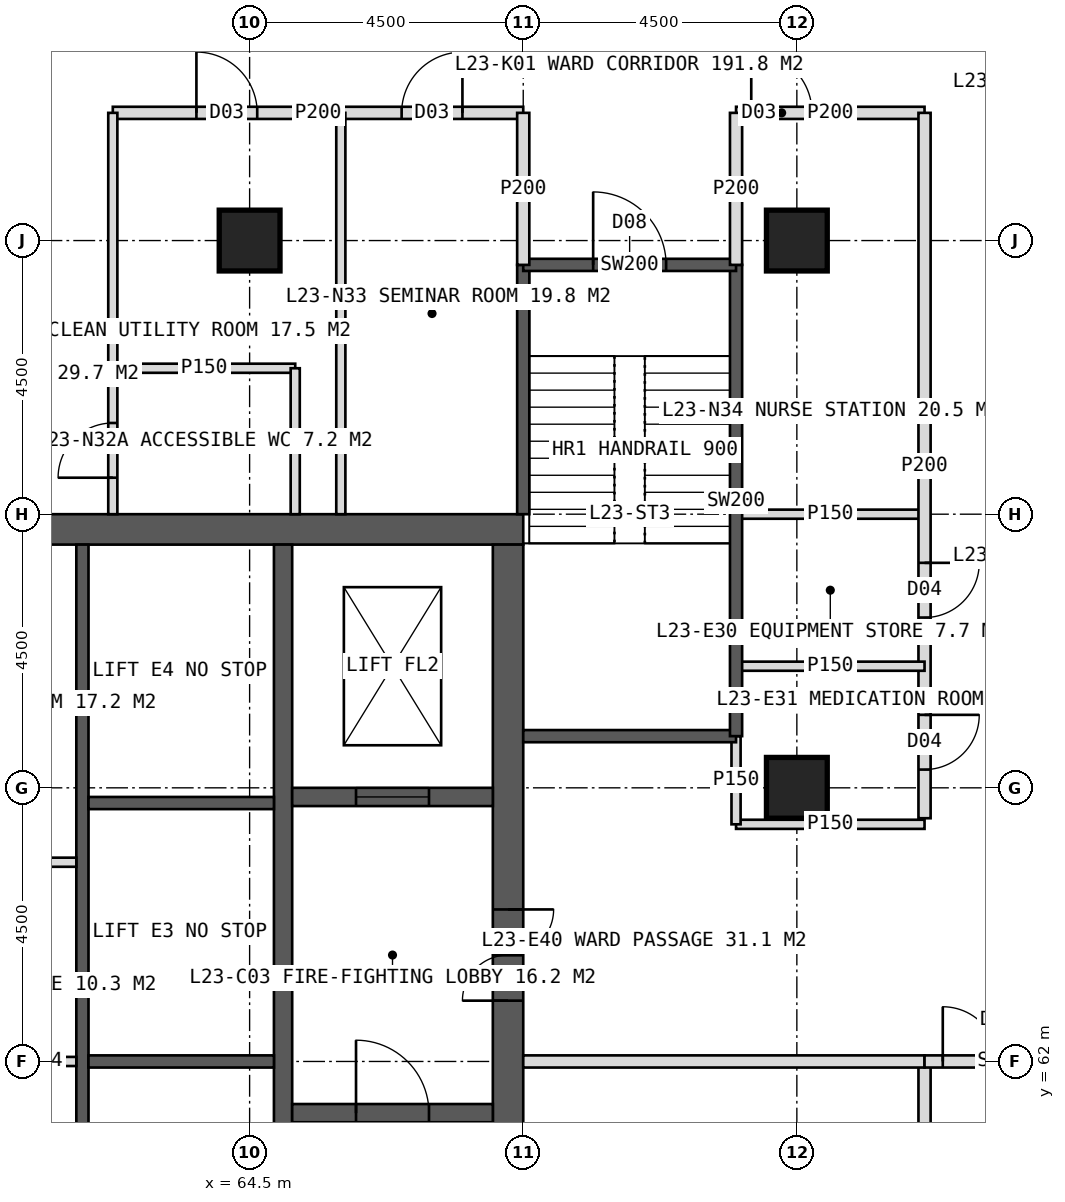
"""IFC4 building model, lengths in metres.
Left out: names, types, materials, properties, quantities, classifications, styles, units other than length and angle.
Written with IfcOpenShell. Run it as: python <this file> out.ifc"""

import sys

from ifc_helpers import new_model, si_unit, direction, frame, frame_2d, origin, origin_2d, place, context, subcontext, project, spatial, rectangle, hollow_rectangle, extrude, element, fill, save


model = new_model("IFC4")
c1 = context("Model", 3, precision=1e-05, world=origin(), true_north=direction((0.0, 1.0)))
c2 = subcontext(c1, "Body", "Model", "MODEL_VIEW")
j1 = project(units=[si_unit("LENGTHUNIT", "METRE"), si_unit("PLANEANGLEUNIT", "RADIAN")], contexts=[c1])
p1 = place(None, origin())
s1 = spatial("IfcSite", under=j1, at=p1, CompositionType="ELEMENT")
p2 = place(p1, origin())
s2 = spatial("IfcBuilding", under=s1, at=p2, CompositionType="ELEMENT")
p3 = place(p2, frame((0.0, 0.0, 100.0)))
s3 = spatial("IfcBuildingStorey", under=s2, at=p3, CompositionType="ELEMENT", Elevation=100.0)
p4 = place(p3, frame((51.0, 70.75, 0.0), z_axis=(0.0, 0.0, 1.0), x_axis=(1.0, 0.0, 0.0)))
e1 = element("IfcWall", 1, at=p4, inside=s3, PredefinedType="SHEAR", context=c2, shape_type="SweptSolid", body=[
    extrude(rectangle(XDim=18.0, YDim=0.5, at=frame_2d((9.0, 0.0))), origin(), (0.0, 0.0, 1.0), 4.0),
])
p5 = place(p4, frame((8.1, 0.0, 0.0)))
e2 = element("IfcOpeningElement", 2, at=p5, cuts=e1, PredefinedType="OPENING", context=c2, shape_type="SweptSolid", body=[
    extrude(rectangle(XDim=1.8, YDim=2.2, at=frame_2d((0.9, 1.1))), frame((0.0, 0.26, 0.0), z_axis=(0.0, -1.0, 0.0), x_axis=(1.0, 0.0, 0.0)), (0.0, 0.0, 1.0), 0.52),
])
p6 = place(p3, frame((68.75, 53.5, 0.0), z_axis=(0.0, 0.0, 1.0), x_axis=(0.0, 1.0, 0.0)))
e3 = element("IfcWall", 3, at=p6, inside=s3, PredefinedType="SHEAR", context=c2, shape_type="SweptSolid", body=[
    extrude(rectangle(XDim=17.0, YDim=0.5, at=frame_2d((8.5, 0.0))), origin(), (0.0, 0.0, 1.0), 4.0),
])
p7 = place(p6, frame((9.5, 0.0, 0.0)))
e4 = element("IfcOpeningElement", 4, at=p7, cuts=e3, PredefinedType="OPENING", context=c2, shape_type="SweptSolid", body=[
    extrude(rectangle(XDim=1.5, YDim=2.2, at=frame_2d((0.75, 1.1))), frame((0.0, 0.26, 0.0), z_axis=(0.0, -1.0, 0.0), x_axis=(1.0, 0.0, 0.0)), (0.0, 0.0, 1.0), 0.52),
])
p8 = place(p3, frame((65.05, 53.5, 0.0), z_axis=(0.0, 0.0, 1.0), x_axis=(0.0, 1.0, 0.0)))
e5 = element("IfcWall", 5, at=p8, inside=s3, PredefinedType="SHEAR", context=c2, shape_type="SweptSolid", body=[
    extrude(rectangle(XDim=17.0, YDim=0.3, at=frame_2d((8.5, 0.0))), origin(), (0.0, 0.0, 1.0), 4.0),
])
p9 = place(p3, frame((61.75, 53.5, 0.0), z_axis=(0.0, 0.0, 1.0), x_axis=(0.0, 1.0, 0.0)))
e6 = element("IfcWall", 6, at=p9, inside=s3, PredefinedType="SHEAR", context=c2, shape_type="SweptSolid", body=[
    extrude(rectangle(XDim=17.0, YDim=0.2, at=frame_2d((8.5, 0.0))), origin(), (0.0, 0.0, 1.0), 4.0),
])
p10 = place(p9, frame((1.375, 0.0, 0.0)))
e7 = element("IfcOpeningElement", 7, at=p10, cuts=e6, PredefinedType="OPENING", context=c2, shape_type="SweptSolid", body=[
    extrude(rectangle(XDim=1.4, YDim=2.2, at=frame_2d((0.7, 1.1))), frame((0.0, 0.11, 0.0), z_axis=(0.0, -1.0, 0.0), x_axis=(1.0, 0.0, 0.0)), (0.0, 0.0, 1.0), 0.22),
])
p11 = place(p9, frame((5.675, 0.0, 0.0)))
e8 = element("IfcOpeningElement", 8, at=p11, cuts=e6, PredefinedType="OPENING", context=c2, shape_type="SweptSolid", body=[
    extrude(rectangle(XDim=1.4, YDim=2.2, at=frame_2d((0.7, 1.1))), frame((0.0, 0.11, 0.0), z_axis=(0.0, -1.0, 0.0), x_axis=(1.0, 0.0, 0.0)), (0.0, 0.0, 1.0), 0.22),
])
for number, where, z_axis, x_axis in (
    (9, (61.85, 62.0, 0.0), (0.0, 0.0, 1.0), (1.0, 0.0, 0.0)),
    (10, (61.85, 66.25, 0.0), (0.0, 0.0, 1.0), (1.0, 0.0, 0.0)),
):
    element("IfcWall", number, at=place(p3, frame(where, z_axis=z_axis, x_axis=x_axis)), inside=s3, PredefinedType="SHEAR", context=c2, shape_type="SweptSolid", body=[
        extrude(rectangle(XDim=3.05, YDim=0.2, at=frame_2d((1.525, 0.0))), origin(), (0.0, 0.0, 1.0), 4.0),
    ])
p12 = place(p3, frame((65.2, 61.15, 0.0), z_axis=(0.0, 0.0, 1.0), x_axis=(1.0, 0.0, 0.0)))
e11 = element("IfcWall", 11, at=p12, inside=s3, PredefinedType="SHEAR", context=c2, shape_type="SweptSolid", body=[
    extrude(rectangle(XDim=3.3, YDim=0.3, at=frame_2d((1.65, 0.0))), origin(), (0.0, 0.0, 1.0), 4.0),
])
p13 = place(p12, frame((1.05, 0.0, 0.0)))
e12 = element("IfcOpeningElement", 12, at=p13, cuts=e11, PredefinedType="OPENING", context=c2, shape_type="SweptSolid", body=[
    extrude(rectangle(XDim=1.2, YDim=2.1, at=frame_2d((0.6, 1.05))), frame((0.0, 0.16, 0.0), z_axis=(0.0, -1.0, 0.0), x_axis=(1.0, 0.0, 0.0)), (0.0, 0.0, 1.0), 0.32),
])
p14 = place(p3, frame((65.2, 66.35, 0.0), z_axis=(0.0, 0.0, 1.0), x_axis=(1.0, 0.0, 0.0)))
e13 = element("IfcWall", 13, at=p14, inside=s3, PredefinedType="SHEAR", context=c2, shape_type="SweptSolid", body=[
    extrude(rectangle(XDim=3.3, YDim=0.3, at=frame_2d((1.65, 0.0))), origin(), (0.0, 0.0, 1.0), 4.0),
])
p15 = place(p14, frame((1.05, 0.0, 0.0)))
e14 = element("IfcOpeningElement", 14, at=p15, cuts=e13, PredefinedType="OPENING", context=c2, shape_type="SweptSolid", body=[
    extrude(rectangle(XDim=1.2, YDim=2.2, at=frame_2d((0.6, 1.1))), frame((0.0, 0.16, 0.0), z_axis=(0.0, -1.0, 0.0), x_axis=(1.0, 0.0, 0.0)), (0.0, 0.0, 1.0), 0.32),
])
for number, where, z_axis, x_axis in (
    (15, (73.5, 75.5, 0.0), (0.0, 0.0, 1.0), (1.0, 0.0, 0.0)),
    (16, (64.5, 75.5, 0.0), (0.0, 0.0, 1.0), (1.0, 0.0, 0.0)),
    (17, (73.5, 66.5, 0.0), (0.0, 0.0, 1.0), (1.0, 0.0, 0.0)),
):
    element("IfcColumn", number, at=place(p3, frame(where, z_axis=z_axis, x_axis=x_axis)), inside=s3, PredefinedType="COLUMN", context=c2, shape_type="SweptSolid", body=[
        extrude(hollow_rectangle(XDim=1.0, YDim=1.0, WallThickness=0.1, at=origin_2d()), origin(), (0.0, 0.0, 1.0), 4.0),
    ])
p16 = place(p3, frame((62.25, 77.6, 0.0), z_axis=(0.0, 0.0, 1.0), x_axis=(1.0, 0.0, 0.0)))
e18 = element("IfcWall", 18, at=p16, inside=s3, PredefinedType="PARTITIONING", context=c2, shape_type="SweptSolid", body=[
    extrude(rectangle(XDim=6.75, YDim=0.2, at=frame_2d((3.375, 0.0))), origin(), (0.0, 0.0, 1.0), 3.75),
])
p17 = place(p16, frame((1.375, 0.0, 0.0)))
e19 = element("IfcOpeningElement", 19, at=p17, cuts=e18, PredefinedType="OPENING", context=c2, shape_type="SweptSolid", body=[
    extrude(rectangle(XDim=1.0, YDim=2.1, at=frame_2d((0.5, 1.05))), frame((0.0, 0.11, 0.0), z_axis=(0.0, -1.0, 0.0), x_axis=(1.0, 0.0, 0.0)), (0.0, 0.0, 1.0), 0.22),
])
p18 = place(p16, frame((4.75, 0.0, 0.0)))
e20 = element("IfcOpeningElement", 20, at=p18, cuts=e18, PredefinedType="OPENING", context=c2, shape_type="SweptSolid", body=[
    extrude(rectangle(XDim=1.0, YDim=2.1, at=frame_2d((0.5, 1.05))), frame((0.0, 0.11, 0.0), z_axis=(0.0, -1.0, 0.0), x_axis=(1.0, 0.0, 0.0)), (0.0, 0.0, 1.0), 0.22),
])
p19 = place(p3, frame((72.5, 77.6, 0.0), z_axis=(0.0, 0.0, 1.0), x_axis=(1.0, 0.0, 0.0)))
e21 = element("IfcWall", 21, at=p19, inside=s3, PredefinedType="PARTITIONING", context=c2, shape_type="SweptSolid", body=[
    extrude(rectangle(XDim=3.1, YDim=0.2, at=frame_2d((1.55, 0.0))), origin(), (0.0, 0.0, 1.0), 3.75),
])
p20 = place(p19, frame((0.25, 0.0, 0.0)))
e22 = element("IfcOpeningElement", 22, at=p20, cuts=e21, PredefinedType="OPENING", context=c2, shape_type="SweptSolid", body=[
    extrude(rectangle(XDim=1.0, YDim=2.1, at=frame_2d((0.5, 1.05))), frame((0.0, 0.11, 0.0), z_axis=(0.0, -1.0, 0.0), x_axis=(1.0, 0.0, 0.0)), (0.0, 0.0, 1.0), 0.22),
])
p21 = place(p3, frame((62.25, 71.0, 0.0), z_axis=(0.0, 0.0, 1.0), x_axis=(0.0, 1.0, 0.0)))
e23 = element("IfcWall", 23, at=p21, inside=s3, PredefinedType="PARTITIONING", context=c2, shape_type="SweptSolid", body=[
    extrude(rectangle(XDim=6.6, YDim=0.15, at=frame_2d((3.3, 0.0))), origin(), (0.0, 0.0, 1.0), 3.75),
])
p22 = place(p21, frame((0.6, 0.0, 0.0)))
e24 = element("IfcOpeningElement", 24, at=p22, cuts=e23, PredefinedType="OPENING", context=c2, shape_type="SweptSolid", body=[
    extrude(rectangle(XDim=0.9, YDim=2.1, at=frame_2d((0.45, 1.05))), frame((0.0, 0.085, 0.0), z_axis=(0.0, -1.0, 0.0), x_axis=(1.0, 0.0, 0.0)), (0.0, 0.0, 1.0), 0.17),
])
p23 = place(p3, frame((66.0, 71.0, 0.0), z_axis=(0.0, 0.0, 1.0), x_axis=(0.0, 1.0, 0.0)))
e25 = element("IfcWall", 25, at=p23, inside=s3, PredefinedType="PARTITIONING", context=c2, shape_type="SweptSolid", body=[
    extrude(rectangle(XDim=6.6, YDim=0.15, at=frame_2d((3.3, 0.0))), origin(), (0.0, 0.0, 1.0), 3.75),
])
p24 = place(p3, frame((62.25, 73.4, 0.0), z_axis=(0.0, 0.0, 1.0), x_axis=(1.0, 0.0, 0.0)))
e26 = element("IfcWall", 26, at=p24, inside=s3, PredefinedType="PARTITIONING", context=c2, shape_type="SweptSolid", body=[
    extrude(rectangle(XDim=3.0, YDim=0.15, at=frame_2d((1.5, 0.0))), origin(), (0.0, 0.0, 1.0), 3.75),
])
p25 = place(p3, frame((65.25, 71.0, 0.0), z_axis=(0.0, 0.0, 1.0), x_axis=(0.0, 1.0, 0.0)))
e27 = element("IfcWall", 27, at=p25, inside=s3, PredefinedType="PARTITIONING", context=c2, shape_type="SweptSolid", body=[
    extrude(rectangle(XDim=2.4, YDim=0.15, at=frame_2d((1.2, 0.0))), origin(), (0.0, 0.0, 1.0), 3.75),
])
p26 = place(p3, frame((72.5, 71.0, 0.0), z_axis=(0.0, 0.0, 1.0), x_axis=(1.0, 0.0, 0.0)))
e28 = element("IfcWall", 28, at=p26, inside=s3, PredefinedType="PARTITIONING", context=c2, shape_type="SweptSolid", body=[
    extrude(rectangle(XDim=3.1, YDim=0.15, at=frame_2d((1.55, 0.0))), origin(), (0.0, 0.0, 1.0), 3.75),
])
p27 = place(p3, frame((75.6, 77.6, 0.0), z_axis=(0.0, 0.0, 1.0), x_axis=(0.0, -1.0, 0.0)))
e29 = element("IfcWall", 29, at=p27, inside=s3, PredefinedType="PARTITIONING", context=c2, shape_type="SweptSolid", body=[
    extrude(rectangle(XDim=11.6, YDim=0.2, at=frame_2d((5.8, 0.0))), origin(), (0.0, 0.0, 1.0), 3.75),
])
p28 = place(p27, frame((7.4, 0.0, 0.0)))
e30 = element("IfcOpeningElement", 30, at=p28, cuts=e29, PredefinedType="OPENING", context=c2, shape_type="SweptSolid", body=[
    extrude(rectangle(XDim=0.9, YDim=2.1, at=frame_2d((0.45, 1.05))), frame((0.0, 0.11, 0.0), z_axis=(0.0, -1.0, 0.0), x_axis=(1.0, 0.0, 0.0)), (0.0, 0.0, 1.0), 0.22),
])
p29 = place(p27, frame((9.9, 0.0, 0.0)))
e31 = element("IfcOpeningElement", 31, at=p29, cuts=e29, PredefinedType="OPENING", context=c2, shape_type="SweptSolid", body=[
    extrude(rectangle(XDim=0.9, YDim=2.1, at=frame_2d((0.45, 1.05))), frame((0.0, 0.11, 0.0), z_axis=(0.0, -1.0, 0.0), x_axis=(1.0, 0.0, 0.0)), (0.0, 0.0, 1.0), 0.22),
])
p30 = place(p3, frame((75.6, 62.0, 0.0), z_axis=(0.0, 0.0, 1.0), x_axis=(0.0, -1.0, 0.0)))
e32 = element("IfcWall", 32, at=p30, inside=s3, PredefinedType="PARTITIONING", context=c2, shape_type="SweptSolid", body=[
    extrude(rectangle(XDim=15.6, YDim=0.2, at=frame_2d((7.8, 0.0))), origin(), (0.0, 0.0, 1.0), 3.75),
])
p31 = place(p30, frame((2.5, 0.0, 0.0)))
e33 = element("IfcOpeningElement", 33, at=p31, cuts=e32, PredefinedType="OPENING", context=c2, shape_type="SweptSolid", body=[
    extrude(rectangle(XDim=1.0, YDim=2.1, at=frame_2d((0.5, 1.05))), frame((0.0, 0.11, 0.0), z_axis=(0.0, -1.0, 0.0), x_axis=(1.0, 0.0, 0.0)), (0.0, 0.0, 1.0), 0.22),
])
p32 = place(p30, frame((7.75, 0.0, 0.0)))
e34 = element("IfcOpeningElement", 34, at=p32, cuts=e32, PredefinedType="OPENING", context=c2, shape_type="SweptSolid", body=[
    extrude(rectangle(XDim=1.0, YDim=2.1, at=frame_2d((0.5, 1.05))), frame((0.0, 0.11, 0.0), z_axis=(0.0, -1.0, 0.0), x_axis=(1.0, 0.0, 0.0)), (0.0, 0.0, 1.0), 0.22),
])
p33 = place(p30, frame((12.55, 0.0, 0.0)))
e35 = element("IfcOpeningElement", 35, at=p33, cuts=e32, PredefinedType="OPENING", context=c2, shape_type="SweptSolid", body=[
    extrude(rectangle(XDim=1.0, YDim=2.1, at=frame_2d((0.5, 1.05))), frame((0.0, 0.11, 0.0), z_axis=(0.0, -1.0, 0.0), x_axis=(1.0, 0.0, 0.0)), (0.0, 0.0, 1.0), 0.22),
])
p34 = place(p3, frame((72.5, 65.9, 0.0), z_axis=(0.0, 0.0, 1.0), x_axis=(1.0, 0.0, 0.0)))
e36 = element("IfcWall", 36, at=p34, inside=s3, PredefinedType="PARTITIONING", context=c2, shape_type="SweptSolid", body=[
    extrude(rectangle(XDim=3.1, YDim=0.15, at=frame_2d((1.55, 0.0))), origin(), (0.0, 0.0, 1.0), 3.75),
])
p35 = place(p3, frame((69.0, 62.0, 0.0), z_axis=(0.0, 0.0, 1.0), x_axis=(1.0, 0.0, 0.0)))
e37 = element("IfcWall", 37, at=p35, inside=s3, PredefinedType="SOLIDWALL", context=c2, shape_type="SweptSolid", body=[
    extrude(rectangle(XDim=6.6, YDim=0.2, at=frame_2d((3.3, 0.0))), origin(), (0.0, 0.0, 1.0), 2.95),
])
p36 = place(p3, frame((72.5, 68.5, 0.0), z_axis=(0.0, 0.0, 1.0), x_axis=(1.0, 0.0, 0.0)))
e38 = element("IfcWall", 38, at=p36, inside=s3, PredefinedType="PARTITIONING", context=c2, shape_type="SweptSolid", body=[
    extrude(rectangle(XDim=3.1, YDim=0.15, at=frame_2d((1.55, 0.0))), origin(), (0.0, 0.0, 1.0), 3.75),
])
p37 = place(p3, frame((75.6, 62.0, 0.0), z_axis=(0.0, 0.0, 1.0), x_axis=(1.0, 0.0, 0.0)))
e39 = element("IfcWall", 39, at=p37, inside=s3, PredefinedType="SOLIDWALL", context=c2, shape_type="SweptSolid", body=[
    extrude(rectangle(XDim=2.7, YDim=0.2, at=frame_2d((1.35, 0.0))), origin(), (0.0, 0.0, 1.0), 2.95),
])
p38 = place(p37, frame((0.3, 0.0, 0.0)))
e40 = element("IfcOpeningElement", 40, at=p38, cuts=e39, PredefinedType="OPENING", context=c2, shape_type="SweptSolid", body=[
    extrude(rectangle(XDim=1.8, YDim=2.2, at=frame_2d((0.9, 1.1))), frame((0.0, 0.11, 0.0), z_axis=(0.0, -1.0, 0.0), x_axis=(1.0, 0.0, 0.0)), (0.0, 0.0, 1.0), 0.22),
])
p39 = place(p3, frame((58.35, 62.0, 0.0), z_axis=(0.0, 0.0, 1.0), x_axis=(1.0, 0.0, 0.0)))
e41 = element("IfcWall", 41, at=p39, inside=s3, PredefinedType="PARTITIONING", context=c2, shape_type="SweptSolid", body=[
    extrude(rectangle(XDim=3.3, YDim=0.15, at=frame_2d((1.65, 0.0))), origin(), (0.0, 0.0, 1.0), 3.75),
])
p40 = place(p39, frame((1.15, 0.0, 0.0)))
e42 = element("IfcOpeningElement", 42, at=p40, cuts=e41, PredefinedType="OPENING", context=c2, shape_type="SweptSolid", body=[
    extrude(rectangle(XDim=1.0, YDim=2.1, at=frame_2d((0.5, 1.05))), frame((0.0, 0.085, 0.0), z_axis=(0.0, -1.0, 0.0), x_axis=(1.0, 0.0, 0.0)), (0.0, 0.0, 1.0), 0.17),
])
p41 = place(p3, frame((58.35, 65.277, 0.0), z_axis=(0.0, 0.0, 1.0), x_axis=(1.0, 0.0, 0.0)))
e43 = element("IfcWall", 43, at=p41, inside=s3, PredefinedType="PARTITIONING", context=c2, shape_type="SweptSolid", body=[
    extrude(rectangle(XDim=3.3, YDim=0.15, at=frame_2d((1.65, 0.0))), origin(), (0.0, 0.0, 1.0), 3.75),
])
p42 = place(p3, frame((72.5, 65.9, 0.0), z_axis=(0.0, 0.0, 1.0), x_axis=(0.0, 1.0, 0.0)))
e44 = element("IfcWall", 44, at=p42, inside=s3, PredefinedType="PARTITIONING", context=c2, shape_type="SweptSolid", body=[
    extrude(rectangle(XDim=1.45, YDim=0.15, at=frame_2d((0.725, 0.0))), origin(), (0.0, 0.0, 1.0), 3.75),
])
p43 = place(p3, frame((69.0, 71.0, 0.0), z_axis=(0.0, 0.0, 1.0), x_axis=(0.0, 1.0, 0.0)))
e45 = element("IfcWall", 45, at=p43, inside=s3, PredefinedType="SOLIDWALL", context=c2, shape_type="SweptSolid", body=[
    extrude(rectangle(XDim=4.1, YDim=0.2, at=frame_2d((2.05, 0.0))), origin(), (0.0, 0.0, 1.0), 3.75),
])
p44 = place(p3, frame((69.0, 67.35, 0.0), z_axis=(0.0, 0.0, 1.0), x_axis=(1.0, 0.0, 0.0)))
e46 = element("IfcWall", 46, at=p44, inside=s3, PredefinedType="SOLIDWALL", context=c2, shape_type="SweptSolid", body=[
    extrude(rectangle(XDim=3.5, YDim=0.2, at=frame_2d((1.75, 0.0))), origin(), (0.0, 0.0, 1.0), 3.75),
])
p45 = place(p3, frame((72.5, 67.35, 0.0), z_axis=(0.0, 0.0, 1.0), x_axis=(0.0, 1.0, 0.0)))
e47 = element("IfcWall", 47, at=p45, inside=s3, PredefinedType="SOLIDWALL", context=c2, shape_type="SweptSolid", body=[
    extrude(rectangle(XDim=7.75, YDim=0.2, at=frame_2d((3.875, 0.0))), origin(), (0.0, 0.0, 1.0), 3.75),
])
p46 = place(p3, frame((69.0, 75.1, 0.0), z_axis=(0.0, 0.0, 1.0), x_axis=(1.0, 0.0, 0.0)))
e48 = element("IfcWall", 48, at=p46, inside=s3, PredefinedType="SOLIDWALL", context=c2, shape_type="SweptSolid", body=[
    extrude(rectangle(XDim=3.5, YDim=0.2, at=frame_2d((1.75, 0.0))), origin(), (0.0, 0.0, 1.0), 3.75),
])
p47 = place(p46, frame((1.15, 0.0, 0.0)))
e49 = element("IfcOpeningElement", 49, at=p47, cuts=e48, PredefinedType="OPENING", context=c2, shape_type="SweptSolid", body=[
    extrude(rectangle(XDim=1.2, YDim=2.1, at=frame_2d((0.6, 1.05))), frame((0.0, 0.11, 0.0), z_axis=(0.0, -1.0, 0.0), x_axis=(1.0, 0.0, 0.0)), (0.0, 0.0, 1.0), 0.22),
])
for number, where, z_axis, x_axis in (
    (50, (69.0, 75.1, 0.0), (0.0, 0.0, 1.0), (0.0, 1.0, 0.0)),
    (51, (72.5, 75.1, 0.0), (0.0, 0.0, 1.0), (0.0, 1.0, 0.0)),
):
    element("IfcWall", number, at=place(p3, frame(where, z_axis=z_axis, x_axis=x_axis)), inside=s3, PredefinedType="PARTITIONING", context=c2, shape_type="SweptSolid", body=[
        extrude(rectangle(XDim=2.5, YDim=0.2, at=frame_2d((1.25, 0.0))), origin(), (0.0, 0.0, 1.0), 3.75),
    ])
p48 = place(p22, origin())
e52 = element("IfcDoor", 52, at=p48, inside=s3, OperationType="SINGLE_SWING_LEFT", PredefinedType="DOOR", context=c2, shape_type="SweptSolid", body=[
    extrude(rectangle(XDim=0.9, YDim=2.1, at=frame_2d((0.45, 1.05))), frame((0.0, 0.025, 0.0), z_axis=(0.0, -1.0, 0.0), x_axis=(1.0, 0.0, 0.0)), (0.0, 0.0, 1.0), 0.05),
])
fill(e24, e52)
p49 = place(p17, origin())
e53 = element("IfcDoor", 53, at=p49, inside=s3, OperationType="SINGLE_SWING_LEFT", PredefinedType="DOOR", context=c2, shape_type="SweptSolid", body=[
    extrude(rectangle(XDim=1.0, YDim=2.1, at=frame_2d((0.5, 1.05))), frame((0.0, 0.025, 0.0), z_axis=(0.0, -1.0, 0.0), x_axis=(1.0, 0.0, 0.0)), (0.0, 0.0, 1.0), 0.05),
])
fill(e19, e53)
p50 = place(p18, origin())
e54 = element("IfcDoor", 54, at=p50, inside=s3, OperationType="SINGLE_SWING_RIGHT", PredefinedType="DOOR", context=c2, shape_type="SweptSolid", body=[
    extrude(rectangle(XDim=1.0, YDim=2.1, at=frame_2d((0.5, 1.05))), frame((0.0, 0.025, 0.0), z_axis=(0.0, -1.0, 0.0), x_axis=(1.0, 0.0, 0.0)), (0.0, 0.0, 1.0), 0.05),
])
fill(e20, e54)
p51 = place(p20, origin())
e55 = element("IfcDoor", 55, at=p51, inside=s3, OperationType="SINGLE_SWING_LEFT", PredefinedType="DOOR", context=c2, shape_type="SweptSolid", body=[
    extrude(rectangle(XDim=1.0, YDim=2.1, at=frame_2d((0.5, 1.05))), frame((0.0, 0.025, 0.0), z_axis=(0.0, -1.0, 0.0), x_axis=(1.0, 0.0, 0.0)), (0.0, 0.0, 1.0), 0.05),
])
fill(e22, e55)
p52 = place(p28, origin())
e56 = element("IfcDoor", 56, at=p52, inside=s3, OperationType="SINGLE_SWING_LEFT", PredefinedType="DOOR", context=c2, shape_type="SweptSolid", body=[
    extrude(rectangle(XDim=0.9, YDim=2.1, at=frame_2d((0.45, 1.05))), frame((0.0, 0.025, 0.0), z_axis=(0.0, -1.0, 0.0), x_axis=(1.0, 0.0, 0.0)), (0.0, 0.0, 1.0), 0.05),
])
fill(e30, e56)
p53 = place(p29, origin())
e57 = element("IfcDoor", 57, at=p53, inside=s3, OperationType="SINGLE_SWING_LEFT", PredefinedType="DOOR", context=c2, shape_type="SweptSolid", body=[
    extrude(rectangle(XDim=0.9, YDim=2.1, at=frame_2d((0.45, 1.05))), frame((0.0, 0.025, 0.0), z_axis=(0.0, -1.0, 0.0), x_axis=(1.0, 0.0, 0.0)), (0.0, 0.0, 1.0), 0.05),
])
fill(e31, e57)
p54 = place(p38, origin())
e58 = element("IfcDoor", 58, at=p54, inside=s3, OperationType="DOUBLE_DOOR_DOUBLE_SWING", PredefinedType="DOOR", context=c2, shape_type="SweptSolid", body=[
    extrude(rectangle(XDim=1.8, YDim=2.2, at=frame_2d((0.9, 1.1))), frame((0.0, 0.025, 0.0), z_axis=(0.0, -1.0, 0.0), x_axis=(1.0, 0.0, 0.0)), (0.0, 0.0, 1.0), 0.05),
])
fill(e40, e58)
p55 = place(p7, origin())
e59 = element("IfcDoor", 59, at=p55, inside=s3, OperationType="DOUBLE_DOOR_SINGLE_SWING", PredefinedType="DOOR", context=c2, shape_type="SweptSolid", body=[
    extrude(rectangle(XDim=1.5, YDim=2.2, at=frame_2d((0.75, 1.1))), frame((0.0, 0.025, 0.0), z_axis=(0.0, -1.0, 0.0), x_axis=(1.0, 0.0, 0.0)), (0.0, 0.0, 1.0), 0.05),
])
fill(e4, e59)
p56 = place(p13, origin())
e60 = element("IfcDoor", 60, at=p56, inside=s3, OperationType="SINGLE_SWING_LEFT", PredefinedType="DOOR", context=c2, shape_type="SweptSolid", body=[
    extrude(rectangle(XDim=1.2, YDim=2.1, at=frame_2d((0.6, 1.05))), frame((0.0, 0.025, 0.0), z_axis=(0.0, -1.0, 0.0), x_axis=(1.0, 0.0, 0.0)), (0.0, 0.0, 1.0), 0.05),
])
fill(e12, e60)
p57 = place(p15, origin())
e61 = element("IfcDoor", 61, at=p57, inside=s3, OperationType="SLIDING_TO_LEFT", PredefinedType="DOOR", context=c2, shape_type="SweptSolid", body=[
    extrude(rectangle(XDim=1.2, YDim=2.2, at=frame_2d((0.6, 1.1))), frame((0.0, 0.025, 0.0), z_axis=(0.0, -1.0, 0.0), x_axis=(1.0, 0.0, 0.0)), (0.0, 0.0, 1.0), 0.05),
])
fill(e14, e61)
p58 = place(p47, origin())
e62 = element("IfcDoor", 62, at=p58, inside=s3, OperationType="SINGLE_SWING_LEFT", PredefinedType="DOOR", context=c2, shape_type="SweptSolid", body=[
    extrude(rectangle(XDim=1.2, YDim=2.1, at=frame_2d((0.6, 1.05))), frame((0.0, 0.025, 0.0), z_axis=(0.0, -1.0, 0.0), x_axis=(1.0, 0.0, 0.0)), (0.0, 0.0, 1.0), 0.05),
])
fill(e49, e62)
save(model, sys.argv[1])
